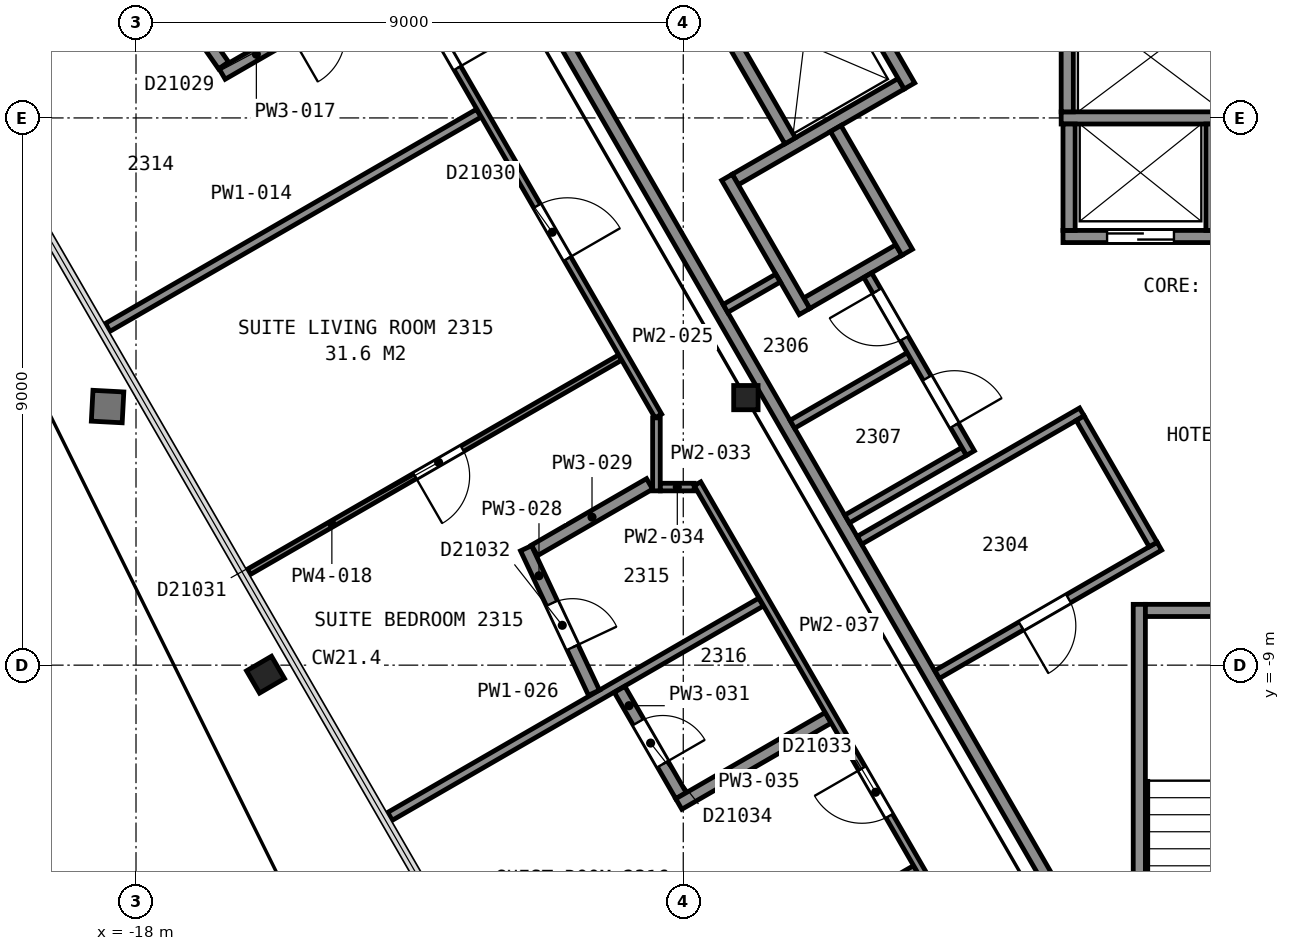
"""IFC4 building model, lengths in metres.
Left out: names, types, materials, properties, quantities, classifications, styles, units other than length and angle.
Written with IfcOpenShell. Run it as: python <this file> out.ifc"""

import sys

from ifc_helpers import new_model, si_unit, direction, frame, frame_2d, origin, origin_2d, place, context, subcontext, project, spatial, rectangle, i_section, extrude, element, fill, save


model = new_model("IFC4")
c1 = context("Model", 3, precision=1e-05, world=origin(), true_north=direction((0.0, 1.0)))
c2 = subcontext(c1, "Body", "Model", "MODEL_VIEW")
j1 = project(units=[si_unit("LENGTHUNIT", "METRE"), si_unit("PLANEANGLEUNIT", "RADIAN")], contexts=[c1])
p1 = place(None, origin())
s1 = spatial("IfcSite", under=j1, at=p1, CompositionType="ELEMENT")
p2 = place(p1, origin())
s2 = spatial("IfcBuilding", under=s1, at=p2, CompositionType="ELEMENT")
p3 = place(p2, frame((0.0, 0.0, 100.0)))
s3 = spatial("IfcBuildingStorey", under=s2, at=p3, CompositionType="ELEMENT", Elevation=100.0)
p4 = place(p3, frame((-19.617, -2.213, 0.04), z_axis=(-0.182620489527, -0.065386844425, 0.981006787632), x_axis=(-0.499563033841, 0.865557819508, -0.035304904861)))
e1 = element("IfcColumn", 1, at=p4, inside=s3, PredefinedType="COLUMN", context=c2, shape_type="SweptSolid", body=[
    extrude(i_section(OverallWidth=0.424, OverallDepth=0.475, WebThickness=0.048, FlangeThickness=0.077, FilletRadius=0.015, at=origin_2d()), origin(), (0.0, 0.0, 1.0), 3.588),
])
p5 = place(p3, frame((-15.676, -9.043, 0.035), z_axis=(-0.16365893308, -0.095479029009, 0.981885690212), x_axis=(-0.5000440218, 0.865999555519, 0.000863772219)))
e2 = element("IfcColumn", 2, at=p5, inside=s3, PredefinedType="COLUMN", context=c2, shape_type="SweptSolid", body=[
    extrude(i_section(OverallWidth=0.424, OverallDepth=0.475, WebThickness=0.048, FlangeThickness=0.077, FilletRadius=0.015, at=origin_2d()), origin(), (0.0, 0.0, 1.0), 3.595),
])
p6 = place(p3, frame((-7.97, -4.6, 0.0), z_axis=(0.0, 0.0, 1.0), x_axis=(1.0, 0.0, 0.0)))
e3 = element("IfcColumn", 3, at=p6, inside=s3, PredefinedType="COLUMN", context=c2, shape_type="SweptSolid", body=[
    extrude(i_section(OverallWidth=0.401, OverallDepth=0.399, WebThickness=0.025, FlangeThickness=0.04, FilletRadius=0.015, at=origin_2d()), origin(), (0.0, 0.0, 1.0), 3.6),
])
p7 = place(p3, frame((-1.5, -8.0, 0.0), z_axis=(0.0, 0.0, 1.0), x_axis=(0.0, -1.0, 0.0)))
e4 = element("IfcWall", 4, at=p7, inside=s3, PredefinedType="PARTITIONING", context=c2, shape_type="SweptSolid", body=[
    extrude(rectangle(XDim=12.0, YDim=0.2, at=frame_2d((6.0, 0.0))), origin(), (0.0, 0.0, 1.0), 3.35),
])
p8 = place(p3, frame((-1.4, -8.1, 0.0), z_axis=(0.0, 0.0, 1.0), x_axis=(1.0, 0.0, 0.0)))
e5 = element("IfcWall", 5, at=p8, inside=s3, PredefinedType="PARTITIONING", context=c2, shape_type="SweptSolid", body=[
    extrude(rectangle(XDim=2.8, YDim=0.2, at=frame_2d((1.4, 0.0))), origin(), (0.0, 0.0, 1.0), 3.35),
])
p9 = place(p3, frame((-2.755, -1.95, 0.0), z_axis=(0.0, 0.0, 1.0), x_axis=(1.0, 0.0, 0.0)))
e6 = element("IfcWall", 6, at=p9, inside=s3, PredefinedType="PARTITIONING", context=c2, shape_type="SweptSolid", body=[
    extrude(rectangle(XDim=2.55, YDim=0.2, at=frame_2d((1.275, 0.0))), origin(), (0.0, 0.0, 1.0), 3.6),
])
p10 = place(p9, frame((0.725, 0.0, 0.0)))
e7 = element("IfcOpeningElement", 7, at=p10, cuts=e6, PredefinedType="OPENING", context=c2, shape_type="SweptSolid", body=[
    extrude(rectangle(XDim=1.1, YDim=2.1, at=frame_2d((0.55, 1.05))), frame((0.0, 0.11, 0.0), z_axis=(0.0, -1.0, 0.0), x_axis=(1.0, 0.0, 0.0)), (0.0, 0.0, 1.0), 0.22),
])
p11 = place(p3, frame((-2.785, 0.0, 0.0), z_axis=(0.0, 0.0, 1.0), x_axis=(1.0, 0.0, 0.0)))
e8 = element("IfcWall", 8, at=p11, inside=s3, PredefinedType="PARTITIONING", context=c2, shape_type="SweptSolid", body=[
    extrude(rectangle(XDim=2.95, YDim=0.2, at=frame_2d((1.475, 0.0))), origin(), (0.0, 0.0, 1.0), 3.6),
])
p12 = place(p3, frame((-6.97, -3.048, 0.0), z_axis=(0.0, 0.0, 1.0), x_axis=(0.866036909293, 0.499980071345, 0.0)))
e9 = element("IfcWall", 9, at=p12, inside=s3, PredefinedType="PARTITIONING", context=c2, shape_type="SweptSolid", body=[
    extrude(rectangle(XDim=1.75, YDim=0.2, at=frame_2d((0.875, 0.0))), origin(), (0.0, 0.0, 1.0), 3.6),
])
p13 = place(p3, frame((-8.145, -1.013, 0.0), z_axis=(0.0, 0.0, 1.0), x_axis=(0.866016494683, 0.500015430699, 0.0)))
e10 = element("IfcWall", 10, at=p13, inside=s3, PredefinedType="PARTITIONING", context=c2, shape_type="SweptSolid", body=[
    extrude(rectangle(XDim=3.15, YDim=0.2, at=frame_2d((1.575, 0.0))), origin(), (0.0, 0.0, 1.0), 3.6),
])
for number, where, z_axis, x_axis in (
    (11, (-0.305, -1.85, 0.0), (0.0, 0.0, 1.0), (0.0, 1.0, 0.0)),
    (12, (-2.655, -1.85, 0.0), (0.0, 0.0, 1.0), (0.0, 1.0, 0.0)),
):
    element("IfcWall", number, at=place(p3, frame(where, z_axis=z_axis, x_axis=x_axis)), inside=s3, PredefinedType="PARTITIONING", context=c2, shape_type="SweptSolid", body=[
        extrude(rectangle(XDim=1.75, YDim=0.2, at=frame_2d((0.875, 0.0))), origin(), (0.0, 0.0, 1.0), 3.6),
    ])
p14 = place(p3, frame((-2.685, 0.1, 0.0), z_axis=(0.0, 0.0, 1.0), x_axis=(0.0, 1.0, 0.0)))
e13 = element("IfcWall", 13, at=p14, inside=s3, PredefinedType="PARTITIONING", context=c2, shape_type="SweptSolid", body=[
    extrude(rectangle(XDim=1.95, YDim=0.2, at=frame_2d((0.975, 0.0))), origin(), (0.0, 0.0, 1.0), 3.6),
])
p15 = place(p3, frame((-5.28, 0.525, 0.0), z_axis=(0.0, 0.0, 1.0), x_axis=(-0.500037662692, 0.866003658127, 0.0)))
e14 = element("IfcWall", 14, at=p15, inside=s3, PredefinedType="PARTITIONING", context=c2, shape_type="SweptSolid", body=[
    extrude(rectangle(XDim=2.95, YDim=0.2, at=frame_2d((1.475, 0.0))), origin(), (0.0, 0.0, 1.0), 3.6),
])
p16 = place(p15, frame((0.925, 0.0, 0.0)))
e15 = element("IfcOpeningElement", 15, at=p16, cuts=e14, PredefinedType="OPENING", context=c2, shape_type="SweptSolid", body=[
    extrude(rectangle(XDim=1.1, YDim=2.1, at=frame_2d((0.55, 1.05))), frame((0.0, 0.11, 0.0), z_axis=(0.0, -1.0, 0.0), x_axis=(1.0, 0.0, 0.0)), (0.0, 0.0, 1.0), 0.22),
])
p17 = place(p3, frame((-5.318, -2.21, 0.0), z_axis=(0.0, 0.0, 1.0), x_axis=(-0.499938297808, 0.866061024631, 0.0)))
e16 = element("IfcWall", 16, at=p17, inside=s3, PredefinedType="PARTITIONING", context=c2, shape_type="SweptSolid", body=[
    extrude(rectangle(XDim=2.35, YDim=0.2, at=frame_2d((1.175, 0.0))), origin(), (0.0, 0.0, 1.0), 3.6),
])
p18 = place(p3, frame((-7.242, -0.376, 0.0), z_axis=(0.0, 0.0, 1.0), x_axis=(-0.499996545922, 0.866027397988, 0.0)))
e17 = element("IfcWall", 17, at=p18, inside=s3, PredefinedType="PARTITIONING", context=c2, shape_type="SweptSolid", body=[
    extrude(rectangle(XDim=2.75, YDim=0.2, at=frame_2d((1.375, 0.0))), origin(), (0.0, 0.0, 1.0), 3.6),
])
p19 = place(p3, frame((-7.006, -3.185, 0.0), z_axis=(0.0, 0.0, 1.0), x_axis=(-0.499990435942, 0.866030925526, 0.0)))
e18 = element("IfcWall", 18, at=p19, inside=s3, PredefinedType="PARTITIONING", context=c2, shape_type="SweptSolid", body=[
    extrude(rectangle(XDim=2.55, YDim=0.2, at=frame_2d((1.275, 0.0))), origin(), (0.0, 0.0, 1.0), 3.6),
])
p20 = place(p3, frame((-13.664, 5.946, 0.0), z_axis=(0.0, 0.0, 1.0), x_axis=(0.499994327219, -0.866028678941, 0.0)))
e19 = element("IfcWall", 19, at=p20, inside=s3, PredefinedType="PARTITIONING", context=c2, shape_type="SweptSolid", body=[
    extrude(rectangle(XDim=23.968, YDim=0.2, at=frame_2d((11.984, 0.0))), origin(), (0.0, 0.0, 1.0), 3.35),
])
p21 = place(p3, frame((-8.306, -3.133, 0.0), z_axis=(0.0, 0.0, 1.0), x_axis=(0.86606747808, 0.499927118101, 0.0)))
e20 = element("IfcWall", 20, at=p21, inside=s3, PredefinedType="PARTITIONING", context=c2, shape_type="SweptSolid", body=[
    extrude(rectangle(XDim=0.998, YDim=0.15, at=frame_2d((0.499, 0.0))), origin(), (0.0, 0.0, 1.0), 3.35),
])
p22 = place(p3, frame((-7.206, -5.038, 0.0), z_axis=(0.0, 0.0, 1.0), x_axis=(0.865944298464, 0.500140452231, 0.0)))
e21 = element("IfcWall", 21, at=p22, inside=s3, PredefinedType="PARTITIONING", context=c2, shape_type="SweptSolid", body=[
    extrude(rectangle(XDim=2.224, YDim=0.15, at=frame_2d((1.112, 0.0))), origin(), (0.0, 0.0, 1.0), 3.35),
])
p23 = place(p3, frame((-6.306, -6.597, 0.0), z_axis=(0.0, 0.0, 1.0), x_axis=(0.866019272134, 0.50001062018, 0.0)))
e22 = element("IfcWall", 22, at=p23, inside=s3, PredefinedType="PARTITIONING", context=c2, shape_type="SweptSolid", body=[
    extrude(rectangle(XDim=2.225, YDim=0.15, at=frame_2d((1.112, 0.0))), origin(), (0.0, 0.0, 1.0), 3.35),
])
p24 = place(p3, frame((-6.1, -6.946, 0.0), z_axis=(0.0, 0.0, 1.0), x_axis=(0.866038200431, 0.499977834903, 0.0)))
e23 = element("IfcWall", 23, at=p24, inside=s3, PredefinedType="PARTITIONING", context=c2, shape_type="SweptSolid", body=[
    extrude(rectangle(XDim=4.22, YDim=0.15, at=frame_2d((2.11, 0.0))), origin(), (0.0, 0.0, 1.0), 3.35),
])
p25 = place(p3, frame((-4.278, -5.512, 0.0), z_axis=(0.0, 0.0, 1.0), x_axis=(-0.499933120428, 0.86606401328, 0.0)))
e24 = element("IfcWall", 24, at=p25, inside=s3, PredefinedType="PARTITIONING", context=c2, shape_type="SweptSolid", body=[
    extrude(rectangle(XDim=3.377, YDim=0.15, at=frame_2d((1.689, 0.0))), origin(), (0.0, 0.0, 1.0), 3.35),
])
p26 = place(p25, frame((2.177, 0.0, 0.0)))
e25 = element("IfcOpeningElement", 25, at=p26, cuts=e24, PredefinedType="OPENING", context=c2, shape_type="SweptSolid", body=[
    extrude(rectangle(XDim=0.9, YDim=2.1, at=frame_2d((0.45, 1.05))), frame((0.0, 0.085, 0.0), z_axis=(0.0, -1.0, 0.0), x_axis=(1.0, 0.0, 0.0)), (0.0, 0.0, 1.0), 0.17),
])
p27 = place(p25, frame((0.525, 0.0, 0.0)))
e26 = element("IfcOpeningElement", 26, at=p27, cuts=e24, PredefinedType="OPENING", context=c2, shape_type="SweptSolid", body=[
    extrude(rectangle(XDim=0.9, YDim=2.1, at=frame_2d((0.45, 1.05))), frame((0.0, 0.085, 0.0), z_axis=(0.0, -1.0, 0.0), x_axis=(1.0, 0.0, 0.0)), (0.0, 0.0, 1.0), 0.17),
])
p28 = place(p3, frame((-4.825, -9.154, 0.0), z_axis=(0.0, 0.0, 1.0), x_axis=(0.866023738697, 0.500002884005, 0.0)))
e27 = element("IfcWall", 27, at=p28, inside=s3, PredefinedType="PARTITIONING", context=c2, shape_type="SweptSolid", body=[
    extrude(rectangle(XDim=4.22, YDim=0.15, at=frame_2d((2.11, 0.0))), origin(), (0.0, 0.0, 1.0), 3.35),
])
p29 = place(p28, frame((1.595, 0.0, 0.0)))
e28 = element("IfcOpeningElement", 28, at=p29, cuts=e27, PredefinedType="OPENING", context=c2, shape_type="SweptSolid", body=[
    extrude(rectangle(XDim=0.9, YDim=2.1, at=frame_2d((0.45, 1.05))), frame((0.0, 0.085, 0.0), z_axis=(0.0, -1.0, 0.0), x_axis=(1.0, 0.0, 0.0)), (0.0, 0.0, 1.0), 0.17),
])
p30 = place(p3, frame((-2.472, -4.938, 0.0), z_axis=(0.0, 0.0, 1.0), x_axis=(0.500045362686, -0.865999212041, 0.0)))
e29 = element("IfcWall", 29, at=p30, inside=s3, PredefinedType="PARTITIONING", context=c2, shape_type="SweptSolid", body=[
    extrude(rectangle(XDim=2.4, YDim=0.15, at=frame_2d((1.2, 0.0))), origin(), (0.0, 0.0, 1.0), 3.35),
])
p31 = place(p3, frame((-18.466, -3.445, 0.0), z_axis=(0.0, 0.0, 1.0), x_axis=(0.86605175433, 0.499954356739, 0.0)))
e30 = element("IfcWall", 30, at=p31, inside=s3, PredefinedType="PARTITIONING", context=c2, shape_type="SweptSolid", body=[
    extrude(rectangle(XDim=7.048, YDim=0.15, at=frame_2d((3.524, 0.0))), origin(), (0.0, 0.0, 1.0), 2.613),
])
p32 = place(p3, frame((-18.17, 3.175, 0.0), z_axis=(0.0, 0.0, 1.0), x_axis=(0.571541682724, -0.820573034476, 0.0)))
e31 = element("IfcWall", 31, at=p32, inside=s3, PredefinedType="PARTITIONING", context=c2, shape_type="SweptSolid", body=[
    extrude(rectangle(XDim=2.818, YDim=0.2, at=frame_2d((1.409, 0.0))), origin(), (0.0, 0.0, 1.0), 2.613),
])
p33 = place(p3, frame((-16.583, 0.723, 0.0), z_axis=(0.0, 0.0, 1.0), x_axis=(0.866001642064, 0.500041154249, 0.0)))
e32 = element("IfcWall", 32, at=p33, inside=s3, PredefinedType="PARTITIONING", context=c2, shape_type="SweptSolid", body=[
    extrude(rectangle(XDim=3.338, YDim=0.2, at=frame_2d((1.669, 0.0))), origin(), (0.0, 0.0, 1.0), 2.613),
])
p34 = place(p33, frame((1.3, 0.0, 0.0)))
e33 = element("IfcOpeningElement", 33, at=p34, cuts=e32, PredefinedType="OPENING", context=c2, shape_type="SweptSolid", body=[
    extrude(rectangle(XDim=0.9, YDim=2.1, at=frame_2d((0.45, 1.05))), frame((0.0, 0.11, 0.0), z_axis=(0.0, -1.0, 0.0), x_axis=(1.0, 0.0, 0.0)), (0.0, 0.0, 1.0), 0.22),
])
p35 = place(p3, frame((-10.037, -3.94, 0.0), z_axis=(0.0, 0.0, 1.0), x_axis=(-0.866063951978, -0.499933226626, 0.0)))
e34 = element("IfcWall", 34, at=p35, inside=s3, PredefinedType="PARTITIONING", context=c2, shape_type="SweptSolid", body=[
    extrude(rectangle(XDim=7.052, YDim=0.1, at=frame_2d((3.526, 0.0))), origin(), (0.0, 0.0, 1.0), 2.613),
])
p36 = place(p35, frame((2.998, 0.0, 0.0)))
e35 = element("IfcOpeningElement", 35, at=p36, cuts=e34, PredefinedType="OPENING", context=c2, shape_type="SweptSolid", body=[
    extrude(rectangle(XDim=0.9, YDim=2.1, at=frame_2d((0.45, 1.05))), frame((0.0, 0.06, 0.0), z_axis=(0.0, -1.0, 0.0), x_axis=(1.0, 0.0, 0.0)), (0.0, 0.0, 1.0), 0.12),
])
p37 = place(p3, frame((-9.41, -4.902, 0.0), z_axis=(0.0, 0.0, 1.0), x_axis=(-0.499971244726, 0.866042005013, 0.0)))
e36 = element("IfcWall", 36, at=p37, inside=s3, PredefinedType="PARTITIONING", context=c2, shape_type="SweptSolid", body=[
    extrude(rectangle(XDim=10.052, YDim=0.125, at=frame_2d((5.026, 0.0))), origin(), (0.0, 0.0, 1.0), 2.613),
])
p38 = place(p37, frame((6.608, 0.0, 0.0)))
e37 = element("IfcOpeningElement", 37, at=p38, cuts=e36, PredefinedType="OPENING", context=c2, shape_type="SweptSolid", body=[
    extrude(rectangle(XDim=1.0, YDim=2.1, at=frame_2d((0.5, 1.05))), frame((0.0, 0.073, 0.0), z_axis=(0.0, -1.0, 0.0), x_axis=(1.0, 0.0, 0.0)), (0.0, 0.0, 1.0), 0.145),
])
p39 = place(p37, frame((2.989, 0.0, 0.0)))
e38 = element("IfcOpeningElement", 38, at=p39, cuts=e36, PredefinedType="OPENING", context=c2, shape_type="SweptSolid", body=[
    extrude(rectangle(XDim=1.0, YDim=2.1, at=frame_2d((0.5, 1.05))), frame((0.0, 0.073, 0.0), z_axis=(0.0, -1.0, 0.0), x_axis=(1.0, 0.0, 0.0)), (0.0, 0.0, 1.0), 0.145),
])
p40 = place(p3, frame((-13.823, -11.487, 0.0), z_axis=(0.0, 0.0, 1.0), x_axis=(0.865980767462, 0.500077304409, 0.0)))
e39 = element("IfcWall", 39, at=p40, inside=s3, PredefinedType="PARTITIONING", context=c2, shape_type="SweptSolid", body=[
    extrude(rectangle(XDim=7.047, YDim=0.15, at=frame_2d((3.524, 0.0))), origin(), (0.0, 0.0, 1.0), 2.613),
])
p41 = place(p3, frame((-11.585, -7.077, 0.0), z_axis=(0.0, 0.0, 1.0), x_axis=(0.425434257814, -0.904989332688, 0.0)))
e40 = element("IfcWall", 40, at=p41, inside=s3, PredefinedType="PARTITIONING", context=c2, shape_type="SweptSolid", body=[
    extrude(rectangle(XDim=2.625, YDim=0.2, at=frame_2d((1.313, 0.0))), origin(), (0.0, 0.0, 1.0), 2.613),
])
p42 = place(p41, frame((1.0, 0.0, 0.0)))
e41 = element("IfcOpeningElement", 41, at=p42, cuts=e40, PredefinedType="OPENING", context=c2, shape_type="SweptSolid", body=[
    extrude(rectangle(XDim=0.8, YDim=2.1, at=frame_2d((0.4, 1.05))), frame((0.0, 0.11, 0.0), z_axis=(0.0, -1.0, 0.0), x_axis=(1.0, 0.0, 0.0)), (0.0, 0.0, 1.0), 0.22),
])
p43 = place(p3, frame((-11.448, -7.113, 0.0), z_axis=(0.0, 0.0, 1.0), x_axis=(0.865960673566, 0.500112099272, 0.0)))
e42 = element("IfcWall", 42, at=p43, inside=s3, PredefinedType="PARTITIONING", context=c2, shape_type="SweptSolid", body=[
    extrude(rectangle(XDim=2.188, YDim=0.2, at=frame_2d((1.094, 0.0))), origin(), (0.0, 0.0, 1.0), 2.613),
])
p44 = place(p3, frame((-11.282, -15.888, 0.0), z_axis=(0.0, 0.0, 1.0), x_axis=(0.866031654768, 0.499989172823, 0.0)))
e43 = element("IfcWall", 43, at=p44, inside=s3, PredefinedType="PARTITIONING", context=c2, shape_type="SweptSolid", body=[
    extrude(rectangle(XDim=7.052, YDim=0.15, at=frame_2d((3.526, 0.0))), origin(), (0.0, 0.0, 1.0), 2.613),
])
p45 = place(p3, frame((-10.047, -9.398, 0.0), z_axis=(0.0, 0.0, 1.0), x_axis=(0.499935208997, -0.866062807656, 0.0)))
e44 = element("IfcWall", 44, at=p45, inside=s3, PredefinedType="PARTITIONING", context=c2, shape_type="SweptSolid", body=[
    extrude(rectangle(XDim=2.02, YDim=0.2, at=frame_2d((1.01, 0.0))), origin(), (0.0, 0.0, 1.0), 2.613),
])
p46 = place(p45, frame((0.62, 0.0, 0.0)))
e45 = element("IfcOpeningElement", 45, at=p46, cuts=e44, PredefinedType="OPENING", context=c2, shape_type="SweptSolid", body=[
    extrude(rectangle(XDim=0.8, YDim=2.1, at=frame_2d((0.4, 1.05))), frame((0.0, 0.11, 0.0), z_axis=(0.0, -1.0, 0.0), x_axis=(1.0, 0.0, 0.0)), (0.0, 0.0, 1.0), 0.22),
])
p47 = place(p3, frame((-9.441, -6.134, 0.0), z_axis=(0.0, 0.0, 1.0), x_axis=(0.0, 1.0, 0.0)))
e46 = element("IfcWall", 46, at=p47, inside=s3, PredefinedType="PARTITIONING", context=c2, shape_type="SweptSolid", body=[
    extrude(rectangle(XDim=1.2, YDim=0.125, at=frame_2d((0.6, 0.0))), origin(), (0.0, 0.0, 1.0), 2.613),
])
p48 = place(p3, frame((-9.376, -6.071, 0.0), z_axis=(0.0, 0.0, 1.0), x_axis=(1.0, 0.0, 0.0)))
e47 = element("IfcWall", 47, at=p48, inside=s3, PredefinedType="PARTITIONING", context=c2, shape_type="SweptSolid", body=[
    extrude(rectangle(XDim=0.556, YDim=0.125, at=frame_2d((0.278, 0.0))), origin(), (0.0, 0.0, 1.0), 2.613),
])
p49 = place(p3, frame((-9.074, -11.284, 0.0), z_axis=(0.0, 0.0, 1.0), x_axis=(0.866197046655, 0.499702587912, 0.0)))
e48 = element("IfcWall", 48, at=p49, inside=s3, PredefinedType="PARTITIONING", context=c2, shape_type="SweptSolid", body=[
    extrude(rectangle(XDim=2.837, YDim=0.2, at=frame_2d((1.418, 0.0))), origin(), (0.0, 0.0, 1.0), 2.613),
])
p50 = place(p3, frame((-3.756, -14.694, 0.0), z_axis=(0.0, 0.0, 1.0), x_axis=(-0.500051472265, 0.865995684219, 0.0)))
e49 = element("IfcWall", 49, at=p50, inside=s3, PredefinedType="PARTITIONING", context=c2, shape_type="SweptSolid", body=[
    extrude(rectangle(XDim=10.02, YDim=0.125, at=frame_2d((5.01, 0.0))), origin(), (0.0, 0.0, 1.0), 2.613),
])
p51 = place(p50, frame((3.711, 0.0, 0.0)))
e50 = element("IfcOpeningElement", 50, at=p51, cuts=e49, PredefinedType="OPENING", context=c2, shape_type="SweptSolid", body=[
    extrude(rectangle(XDim=0.9, YDim=2.1, at=frame_2d((0.45, 1.05))), frame((0.0, 0.073, 0.0), z_axis=(0.0, -1.0, 0.0), x_axis=(1.0, 0.0, 0.0)), (0.0, 0.0, 1.0), 0.145),
])
p52 = place(p10, origin())
e51 = element("IfcDoor", 51, at=p52, inside=s3, OperationType="SLIDING_TO_RIGHT", PredefinedType="DOOR", context=c2, shape_type="SweptSolid", body=[
    extrude(rectangle(XDim=1.1, YDim=2.1, at=frame_2d((0.55, 1.05))), frame((0.0, 0.025, 0.0), z_axis=(0.0, -1.0, 0.0), x_axis=(1.0, 0.0, 0.0)), (0.0, 0.0, 1.0), 0.05),
])
fill(e7, e51)
p53 = place(p26, origin())
e52 = element("IfcDoor", 52, at=p53, inside=s3, OperationType="SINGLE_SWING_RIGHT", PredefinedType="DOOR", context=c2, shape_type="SweptSolid", body=[
    extrude(rectangle(XDim=0.9, YDim=2.1, at=frame_2d((0.45, 1.05))), frame((0.0, 0.025, 0.0), z_axis=(0.0, -1.0, 0.0), x_axis=(1.0, 0.0, 0.0)), (0.0, 0.0, 1.0), 0.05),
])
fill(e25, e52)
p54 = place(p27, origin())
e53 = element("IfcDoor", 53, at=p54, inside=s3, OperationType="SINGLE_SWING_LEFT", PredefinedType="DOOR", context=c2, shape_type="SweptSolid", body=[
    extrude(rectangle(XDim=0.9, YDim=2.1, at=frame_2d((0.45, 1.05))), frame((0.0, 0.025, 0.0), z_axis=(0.0, -1.0, 0.0), x_axis=(1.0, 0.0, 0.0)), (0.0, 0.0, 1.0), 0.05),
])
fill(e26, e53)
p55 = place(p29, origin())
e54 = element("IfcDoor", 54, at=p55, inside=s3, OperationType="SINGLE_SWING_LEFT", PredefinedType="DOOR", context=c2, shape_type="SweptSolid", body=[
    extrude(rectangle(XDim=0.9, YDim=2.1, at=frame_2d((0.45, 1.05))), frame((0.0, 0.025, 0.0), z_axis=(0.0, -1.0, 0.0), x_axis=(1.0, 0.0, 0.0)), (0.0, 0.0, 1.0), 0.05),
])
fill(e28, e54)
p56 = place(p36, origin())
e55 = element("IfcDoor", 55, at=p56, inside=s3, OperationType="SINGLE_SWING_RIGHT", PredefinedType="DOOR", context=c2, shape_type="SweptSolid", body=[
    extrude(rectangle(XDim=0.9, YDim=2.1, at=frame_2d((0.45, 1.05))), frame((0.0, 0.025, 0.0), z_axis=(0.0, -1.0, 0.0), x_axis=(1.0, 0.0, 0.0)), (0.0, 0.0, 1.0), 0.05),
])
fill(e35, e55)
p57 = place(p38, origin())
e56 = element("IfcDoor", 56, at=p57, inside=s3, OperationType="SINGLE_SWING_LEFT", PredefinedType="DOOR", context=c2, shape_type="SweptSolid", body=[
    extrude(rectangle(XDim=1.0, YDim=2.1, at=frame_2d((0.5, 1.05))), frame((0.0, 0.025, 0.0), z_axis=(0.0, -1.0, 0.0), x_axis=(1.0, 0.0, 0.0)), (0.0, 0.0, 1.0), 0.05),
])
fill(e37, e56)
p58 = place(p39, origin())
e57 = element("IfcDoor", 57, at=p58, inside=s3, OperationType="SINGLE_SWING_LEFT", PredefinedType="DOOR", context=c2, shape_type="SweptSolid", body=[
    extrude(rectangle(XDim=1.0, YDim=2.1, at=frame_2d((0.5, 1.05))), frame((0.0, 0.025, 0.0), z_axis=(0.0, -1.0, 0.0), x_axis=(1.0, 0.0, 0.0)), (0.0, 0.0, 1.0), 0.05),
])
fill(e38, e57)
p59 = place(p42, origin())
e58 = element("IfcDoor", 58, at=p59, inside=s3, OperationType="SINGLE_SWING_RIGHT", PredefinedType="DOOR", context=c2, shape_type="SweptSolid", body=[
    extrude(rectangle(XDim=0.8, YDim=2.1, at=frame_2d((0.4, 1.05))), frame((0.0, 0.025, 0.0), z_axis=(0.0, -1.0, 0.0), x_axis=(1.0, 0.0, 0.0)), (0.0, 0.0, 1.0), 0.05),
])
fill(e41, e58)
p60 = place(p46, origin())
e59 = element("IfcDoor", 59, at=p60, inside=s3, OperationType="SINGLE_SWING_RIGHT", PredefinedType="DOOR", context=c2, shape_type="SweptSolid", body=[
    extrude(rectangle(XDim=0.8, YDim=2.1, at=frame_2d((0.4, 1.05))), frame((0.0, 0.025, 0.0), z_axis=(0.0, -1.0, 0.0), x_axis=(1.0, 0.0, 0.0)), (0.0, 0.0, 1.0), 0.05),
])
fill(e45, e59)
p61 = place(p51, origin())
e60 = element("IfcDoor", 60, at=p61, inside=s3, OperationType="SINGLE_SWING_RIGHT", PredefinedType="DOOR", context=c2, shape_type="SweptSolid", body=[
    extrude(rectangle(XDim=0.9, YDim=2.1, at=frame_2d((0.45, 1.05))), frame((0.0, 0.025, 0.0), z_axis=(0.0, -1.0, 0.0), x_axis=(1.0, 0.0, 0.0)), (0.0, 0.0, 1.0), 0.05),
])
fill(e50, e60)
save(model, sys.argv[1])
